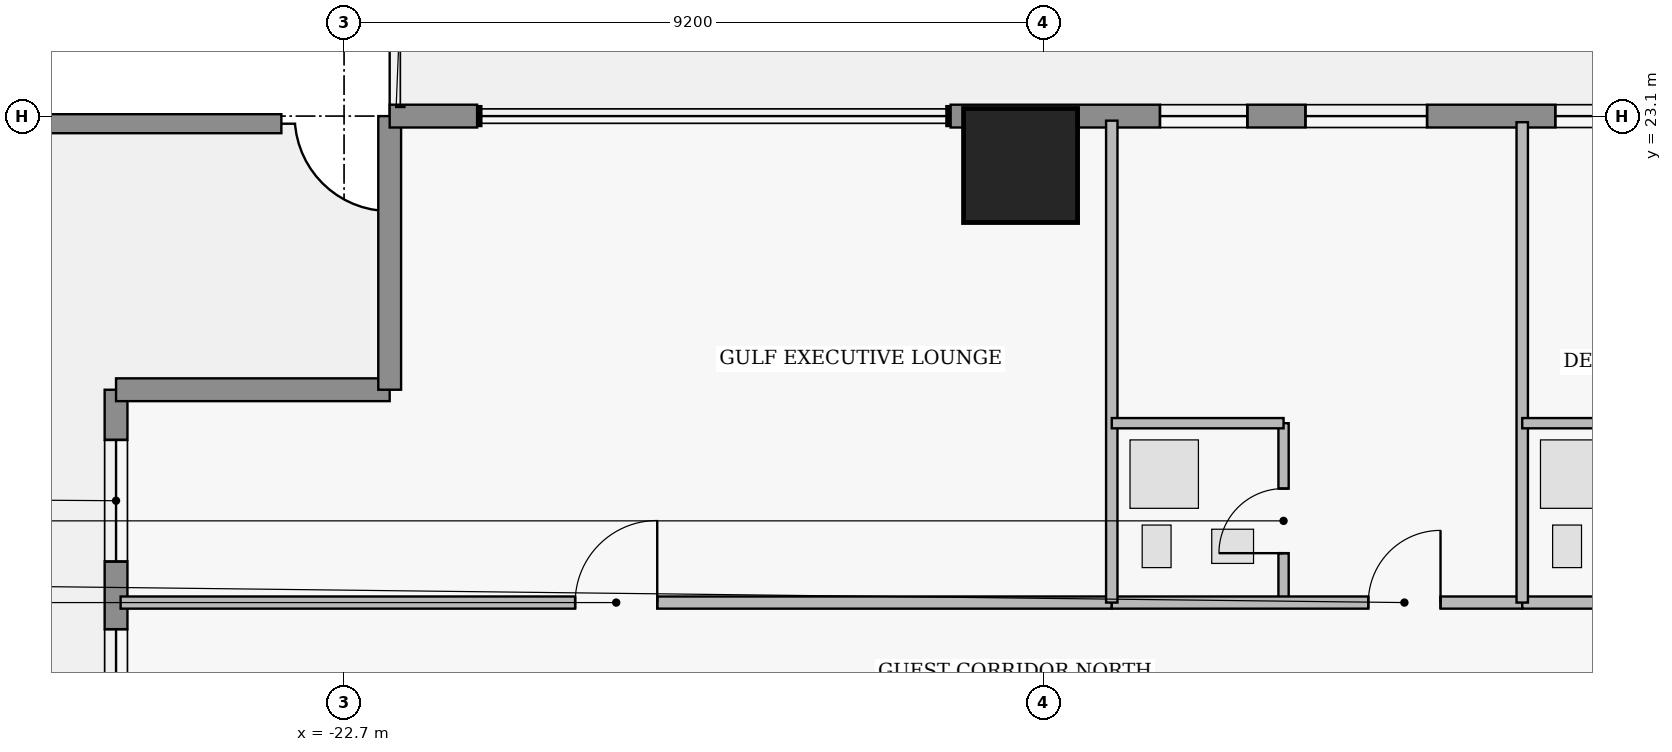
"""IFC4 building model, lengths in metres.
Left out: names, types, materials, properties, quantities, classifications, styles, units other than length and angle.
Written with IfcOpenShell. Run it as: python <this file> out.ifc"""

import sys

from ifc_helpers import new_model, si_unit, direction, frame, frame_2d, origin, origin_2d, place, context, subcontext, project, spatial, rectangle, extrude, element, fill, save


model = new_model("IFC4")
c1 = context("Model", 3, precision=1e-05, world=origin(), true_north=direction((0.0, 1.0)))
c2 = subcontext(c1, "Body", "Model", "MODEL_VIEW")
j1 = project(units=[si_unit("LENGTHUNIT", "METRE"), si_unit("PLANEANGLEUNIT", "RADIAN")], contexts=[c1])
p1 = place(None, origin())
s1 = spatial("IfcSite", under=j1, at=p1, CompositionType="ELEMENT")
p2 = place(p1, origin())
s2 = spatial("IfcBuilding", under=s1, at=p2, CompositionType="ELEMENT")
p3 = place(p2, frame((0.0, 0.0, 27.6)))
s3 = spatial("IfcBuildingStorey", under=s2, at=p3, CompositionType="ELEMENT", Elevation=27.6)
p4 = place(p3, frame((-13.8, 22.45, 0.0), z_axis=(0.0, 0.0, 1.0), x_axis=(1.0, 0.0, 0.0)))
e1 = element("IfcColumn", 1, at=p4, inside=s3, PredefinedType="COLUMN", context=c2, shape_type="SweptSolid", body=[
    extrude(rectangle(XDim=1.5, YDim=1.5, at=origin_2d()), origin(), (0.0, 0.0, 1.0), 3.65),
])
p5 = place(p3, frame((-31.82, 23.0, 0.0), z_axis=(0.0, 0.0, 1.0), x_axis=(1.0, 0.0, 0.0)))
e2 = element("IfcWall", 2, at=p5, inside=s3, PredefinedType="PARAPET", context=c2, shape_type="SweptSolid", body=[
    extrude(rectangle(XDim=8.295, YDim=0.25, at=frame_2d((4.147, 0.0))), origin(), (0.0, 0.0, 1.0), 1.15),
])
p6 = place(p3, frame((-25.7, 14.4, 0.0), z_axis=(0.0, 0.0, 1.0), x_axis=(0.0, 1.0, 0.0)))
e3 = element("IfcWall", 3, at=p6, inside=s3, PredefinedType="STANDARD", context=c2, shape_type="SweptSolid", body=[
    extrude(rectangle(XDim=5.1, YDim=0.3, at=frame_2d((2.55, 0.0))), origin(), (0.0, 0.0, 1.0), 3.43),
])
p7 = place(p6, frame((0.8, 0.0, 0.95)))
e4 = element("IfcOpeningElement", 4, at=p7, cuts=e3, PredefinedType="OPENING", context=c2, shape_type="SweptSolid", body=[
    extrude(rectangle(XDim=1.15, YDim=1.55, at=frame_2d((0.575, 0.775))), frame((0.0, 0.16, 0.0), z_axis=(0.0, -1.0, 0.0), x_axis=(1.0, 0.0, 0.0)), (0.0, 0.0, 1.0), 0.32),
])
p8 = place(p6, frame((2.84, 0.0, 0.85)))
e5 = element("IfcOpeningElement", 5, at=p8, cuts=e3, PredefinedType="OPENING", context=c2, shape_type="SweptSolid", body=[
    extrude(rectangle(XDim=1.6, YDim=1.8, at=frame_2d((0.8, 0.9))), frame((0.0, 0.16, 0.0), z_axis=(0.0, -1.0, 0.0), x_axis=(1.0, 0.0, 0.0)), (0.0, 0.0, 1.0), 0.32),
])
p9 = place(p3, frame((-25.7, 19.5, 0.0), z_axis=(0.0, 0.0, 1.0), x_axis=(1.0, 0.0, 0.0)))
e6 = element("IfcWall", 6, at=p9, inside=s3, PredefinedType="STANDARD", context=c2, shape_type="SweptSolid", body=[
    extrude(rectangle(XDim=3.6, YDim=0.3, at=frame_2d((1.8, 0.0))), origin(), (0.0, 0.0, 1.0), 3.43),
])
p10 = place(p3, frame((-22.1, 19.5, 0.0), z_axis=(0.0, 0.0, 1.0), x_axis=(0.0, 1.0, 0.0)))
e7 = element("IfcWall", 7, at=p10, inside=s3, PredefinedType="STANDARD", context=c2, shape_type="SweptSolid", body=[
    extrude(rectangle(XDim=3.6, YDim=0.3, at=frame_2d((1.8, 0.0))), origin(), (0.0, 0.0, 1.0), 3.43),
])
p11 = place(p3, frame((-22.1, 23.1, 0.0), z_axis=(0.0, 0.0, 1.0), x_axis=(1.0, 0.0, 0.0)))
e8 = element("IfcWall", 8, at=p11, inside=s3, PredefinedType="STANDARD", context=c2, shape_type="SweptSolid", body=[
    extrude(rectangle(XDim=1.15, YDim=0.3, at=frame_2d((0.575, 0.0))), origin(), (0.0, 0.0, 1.0), 3.43),
])
p12 = place(p3, frame((-14.72, 23.1, 0.0), z_axis=(0.0, 0.0, 1.0), x_axis=(1.0, 0.0, 0.0)))
e9 = element("IfcWall", 9, at=p12, inside=s3, PredefinedType="STANDARD", context=c2, shape_type="SweptSolid", body=[
    extrude(rectangle(XDim=20.24, YDim=0.3, at=frame_2d((10.12, 0.0))), origin(), (0.0, 0.0, 1.0), 3.43),
])
p13 = place(p12, frame((14.555, 0.0, 0.0)))
e10 = element("IfcOpeningElement", 10, at=p13, cuts=e9, PredefinedType="OPENING", context=c2, shape_type="SweptSolid", body=[
    extrude(rectangle(XDim=1.05, YDim=2.2, at=frame_2d((0.525, 1.1))), frame((0.0, 0.16, 0.0), z_axis=(0.0, -1.0, 0.0), x_axis=(1.0, 0.0, 0.0)), (0.0, 0.0, 1.0), 0.32),
])
p14 = place(p12, frame((4.668, 0.0, 0.85)))
e11 = element("IfcOpeningElement", 11, at=p14, cuts=e9, PredefinedType="OPENING", context=c2, shape_type="SweptSolid", body=[
    extrude(rectangle(XDim=1.6, YDim=1.8, at=frame_2d((0.8, 0.9))), frame((0.0, 0.16, 0.0), z_axis=(0.0, -1.0, 0.0), x_axis=(1.0, 0.0, 0.0)), (0.0, 0.0, 1.0), 0.32),
])
p15 = place(p12, frame((2.754, 0.0, 0.95)))
e12 = element("IfcOpeningElement", 12, at=p15, cuts=e9, PredefinedType="OPENING", context=c2, shape_type="SweptSolid", body=[
    extrude(rectangle(XDim=1.15, YDim=1.55, at=frame_2d((0.575, 0.775))), frame((0.0, 0.16, 0.0), z_axis=(0.0, -1.0, 0.0), x_axis=(1.0, 0.0, 0.0)), (0.0, 0.0, 1.0), 0.32),
])
p16 = place(p12, frame((7.955, 0.0, 0.95)))
e13 = element("IfcOpeningElement", 13, at=p16, cuts=e9, PredefinedType="OPENING", context=c2, shape_type="SweptSolid", body=[
    extrude(rectangle(XDim=1.15, YDim=1.55, at=frame_2d((0.575, 0.775))), frame((0.0, 0.16, 0.0), z_axis=(0.0, -1.0, 0.0), x_axis=(1.0, 0.0, 0.0)), (0.0, 0.0, 1.0), 0.32),
])
p17 = place(p12, frame((11.31, 0.0, 0.85)))
e14 = element("IfcOpeningElement", 14, at=p17, cuts=e9, PredefinedType="OPENING", context=c2, shape_type="SweptSolid", body=[
    extrude(rectangle(XDim=1.6, YDim=1.8, at=frame_2d((0.8, 0.9))), frame((0.0, 0.16, 0.0), z_axis=(0.0, -1.0, 0.0), x_axis=(1.0, 0.0, 0.0)), (0.0, 0.0, 1.0), 0.32),
])
p18 = place(p12, frame((16.427, 0.0, 0.85)))
e15 = element("IfcOpeningElement", 15, at=p18, cuts=e9, PredefinedType="OPENING", context=c2, shape_type="SweptSolid", body=[
    extrude(rectangle(XDim=1.6, YDim=1.8, at=frame_2d((0.8, 0.9))), frame((0.0, 0.16, 0.0), z_axis=(0.0, -1.0, 0.0), x_axis=(1.0, 0.0, 0.0)), (0.0, 0.0, 1.0), 0.32),
])
p19 = place(p3, frame((-25.64, 16.7, 0.0), z_axis=(0.0, 0.0, 1.0), x_axis=(1.0, 0.0, 0.0)))
e16 = element("IfcWall", 16, at=p19, inside=s3, PredefinedType="PARTITIONING", context=c2, shape_type="SweptSolid", body=[
    extrude(rectangle(XDim=13.04, YDim=0.16, at=frame_2d((6.52, 0.0))), origin(), (0.0, 0.0, 1.0), 2.973),
])
p20 = place(p19, frame((5.98, 0.0, 0.0)))
e17 = element("IfcOpeningElement", 17, at=p20, cuts=e16, PredefinedType="OPENING", context=c2, shape_type="SweptSolid", body=[
    extrude(rectangle(XDim=1.08, YDim=2.18, at=frame_2d((0.54, 1.09))), frame((0.0, 0.09, 0.0), z_axis=(0.0, -1.0, 0.0), x_axis=(1.0, 0.0, 0.0)), (0.0, 0.0, 1.0), 0.18),
])
p21 = place(p3, frame((-10.34, 16.7, 0.0), z_axis=(0.0, 0.0, 1.0), x_axis=(0.0, 1.0, 0.0)))
e18 = element("IfcWall", 18, at=p21, inside=s3, PredefinedType="PLUMBINGWALL", context=c2, shape_type="SweptSolid", body=[
    extrude(rectangle(XDim=2.36, YDim=0.135, at=frame_2d((1.18, 0.0))), origin(), (0.0, 0.0, 1.0), 3.43),
])
p22 = place(p21, frame((0.65, 0.0, 0.0)))
e19 = element("IfcOpeningElement", 19, at=p22, cuts=e18, PredefinedType="OPENING", context=c2, shape_type="SweptSolid", body=[
    extrude(rectangle(XDim=0.85, YDim=2.1, at=frame_2d((0.425, 1.05))), frame((0.0, 0.077, 0.0), z_axis=(0.0, -1.0, 0.0), x_axis=(1.0, 0.0, 0.0)), (0.0, 0.0, 1.0), 0.155),
])
p23 = place(p3, frame((-12.6, 16.7, 0.0), z_axis=(0.0, 0.0, 1.0), x_axis=(1.0, 0.0, 0.0)))
e20 = element("IfcWall", 20, at=p23, inside=s3, PredefinedType="PARTITIONING", context=c2, shape_type="SweptSolid", body=[
    extrude(rectangle(XDim=5.4, YDim=0.16, at=frame_2d((2.7, 0.0))), origin(), (0.0, 0.0, 1.0), 2.973),
])
p24 = place(p23, frame((3.375, 0.0, 0.0)))
e21 = element("IfcOpeningElement", 21, at=p24, cuts=e20, PredefinedType="OPENING", context=c2, shape_type="SweptSolid", body=[
    extrude(rectangle(XDim=0.95, YDim=2.15, at=frame_2d((0.475, 1.075))), frame((0.0, 0.09, 0.0), z_axis=(0.0, -1.0, 0.0), x_axis=(1.0, 0.0, 0.0)), (0.0, 0.0, 1.0), 0.18),
])
p25 = place(p3, frame((-7.2, 16.7, 0.0), z_axis=(0.0, 0.0, 1.0), x_axis=(1.0, 0.0, 0.0)))
e22 = element("IfcWall", 22, at=p25, inside=s3, PredefinedType="PARTITIONING", context=c2, shape_type="SweptSolid", body=[
    extrude(rectangle(XDim=6.0, YDim=0.16, at=frame_2d((3.0, 0.0))), origin(), (0.0, 0.0, 1.0), 2.973),
])
p26 = place(p25, frame((3.675, 0.0, 0.0)))
e23 = element("IfcOpeningElement", 23, at=p26, cuts=e22, PredefinedType="OPENING", context=c2, shape_type="SweptSolid", body=[
    extrude(rectangle(XDim=0.95, YDim=2.15, at=frame_2d((0.475, 1.075))), frame((0.0, 0.09, 0.0), z_axis=(0.0, -1.0, 0.0), x_axis=(1.0, 0.0, 0.0)), (0.0, 0.0, 1.0), 0.18),
])
p27 = place(p3, frame((-12.6, 16.7, 0.0), z_axis=(0.0, 0.0, 1.0), x_axis=(0.0, 1.0, 0.0)))
e24 = element("IfcWall", 24, at=p27, inside=s3, PredefinedType="PARTITIONING", context=c2, shape_type="SweptSolid", body=[
    extrude(rectangle(XDim=6.34, YDim=0.15, at=frame_2d((3.17, 0.0))), origin(), (0.0, 0.0, 1.0), 3.43),
])
p28 = place(p3, frame((-12.6, 19.06, 0.0), z_axis=(0.0, 0.0, 1.0), x_axis=(1.0, 0.0, 0.0)))
e25 = element("IfcWall", 25, at=p28, inside=s3, PredefinedType="PLUMBINGWALL", context=c2, shape_type="SweptSolid", body=[
    extrude(rectangle(XDim=2.26, YDim=0.135, at=frame_2d((1.13, 0.0))), origin(), (0.0, 0.0, 1.0), 2.973),
])
p29 = place(p3, frame((-7.2, 16.7, 0.0), z_axis=(0.0, 0.0, 1.0), x_axis=(0.0, 1.0, 0.0)))
e26 = element("IfcWall", 26, at=p29, inside=s3, PredefinedType="PARTITIONING", context=c2, shape_type="SweptSolid", body=[
    extrude(rectangle(XDim=6.32, YDim=0.15, at=frame_2d((3.16, 0.0))), origin(), (0.0, 0.0, 1.0), 3.43),
])
p30 = place(p3, frame((-7.2, 19.06, 0.0), z_axis=(0.0, 0.0, 1.0), x_axis=(1.0, 0.0, 0.0)))
e27 = element("IfcWall", 27, at=p30, inside=s3, PredefinedType="PLUMBINGWALL", context=c2, shape_type="SweptSolid", body=[
    extrude(rectangle(XDim=2.26, YDim=0.135, at=frame_2d((1.13, 0.0))), origin(), (0.0, 0.0, 1.0), 2.973),
])
p31 = place(p7, origin())
e28 = element("IfcWindow", 28, at=p31, inside=s3, PartitioningType="SINGLE_PANEL", PredefinedType="WINDOW", context=c2, shape_type="SweptSolid", body=[
    extrude(rectangle(XDim=1.15, YDim=1.55, at=frame_2d((0.575, 0.775))), frame((0.0, 0.03, 0.0), z_axis=(0.0, -1.0, 0.0), x_axis=(1.0, 0.0, 0.0)), (0.0, 0.0, 1.0), 0.06),
])
fill(e4, e28)
p32 = place(p8, origin())
e29 = element("IfcWindow", 29, at=p32, inside=s3, PartitioningType="SINGLE_PANEL", PredefinedType="WINDOW", context=c2, shape_type="SweptSolid", body=[
    extrude(rectangle(XDim=1.6, YDim=1.8, at=frame_2d((0.8, 0.9))), frame((0.0, 0.03, 0.0), z_axis=(0.0, -1.0, 0.0), x_axis=(1.0, 0.0, 0.0)), (0.0, 0.0, 1.0), 0.06),
])
fill(e5, e29)
p33 = place(p14, origin())
e30 = element("IfcWindow", 30, at=p33, inside=s3, PartitioningType="SINGLE_PANEL", PredefinedType="WINDOW", context=c2, shape_type="SweptSolid", body=[
    extrude(rectangle(XDim=1.6, YDim=1.8, at=frame_2d((0.8, 0.9))), frame((0.0, 0.03, 0.0), z_axis=(0.0, -1.0, 0.0), x_axis=(1.0, 0.0, 0.0)), (0.0, 0.0, 1.0), 0.06),
])
fill(e11, e30)
p34 = place(p15, origin())
e31 = element("IfcWindow", 31, at=p34, inside=s3, PartitioningType="SINGLE_PANEL", PredefinedType="WINDOW", context=c2, shape_type="SweptSolid", body=[
    extrude(rectangle(XDim=1.15, YDim=1.55, at=frame_2d((0.575, 0.775))), frame((0.0, 0.03, 0.0), z_axis=(0.0, -1.0, 0.0), x_axis=(1.0, 0.0, 0.0)), (0.0, 0.0, 1.0), 0.06),
])
fill(e12, e31)
p35 = place(p16, origin())
e32 = element("IfcWindow", 32, at=p35, inside=s3, PartitioningType="SINGLE_PANEL", PredefinedType="WINDOW", context=c2, shape_type="SweptSolid", body=[
    extrude(rectangle(XDim=1.15, YDim=1.55, at=frame_2d((0.575, 0.775))), frame((0.0, 0.03, 0.0), z_axis=(0.0, -1.0, 0.0), x_axis=(1.0, 0.0, 0.0)), (0.0, 0.0, 1.0), 0.06),
])
fill(e13, e32)
p36 = place(p20, origin())
e33 = element("IfcDoor", 33, at=p36, inside=s3, OperationType="SINGLE_SWING_RIGHT", PredefinedType="DOOR", context=c2, shape_type="SweptSolid", body=[
    extrude(rectangle(XDim=1.08, YDim=2.18, at=frame_2d((0.54, 1.09))), frame((0.0, 0.025, 0.0), z_axis=(0.0, -1.0, 0.0), x_axis=(1.0, 0.0, 0.0)), (0.0, 0.0, 1.0), 0.05),
])
fill(e17, e33)
p37 = place(p22, origin())
e34 = element("IfcDoor", 34, at=p37, inside=s3, OperationType="SINGLE_SWING_LEFT", PredefinedType="DOOR", context=c2, shape_type="SweptSolid", body=[
    extrude(rectangle(XDim=0.85, YDim=2.1, at=frame_2d((0.425, 1.05))), frame((0.0, 0.025, 0.0), z_axis=(0.0, -1.0, 0.0), x_axis=(1.0, 0.0, 0.0)), (0.0, 0.0, 1.0), 0.05),
])
fill(e19, e34)
p38 = place(p24, origin())
e35 = element("IfcDoor", 35, at=p38, inside=s3, OperationType="SINGLE_SWING_RIGHT", PredefinedType="DOOR", context=c2, shape_type="SweptSolid", body=[
    extrude(rectangle(XDim=0.95, YDim=2.15, at=frame_2d((0.475, 1.075))), frame((0.0, 0.025, 0.0), z_axis=(0.0, -1.0, 0.0), x_axis=(1.0, 0.0, 0.0)), (0.0, 0.0, 1.0), 0.05),
])
fill(e21, e35)
save(model, sys.argv[1])
